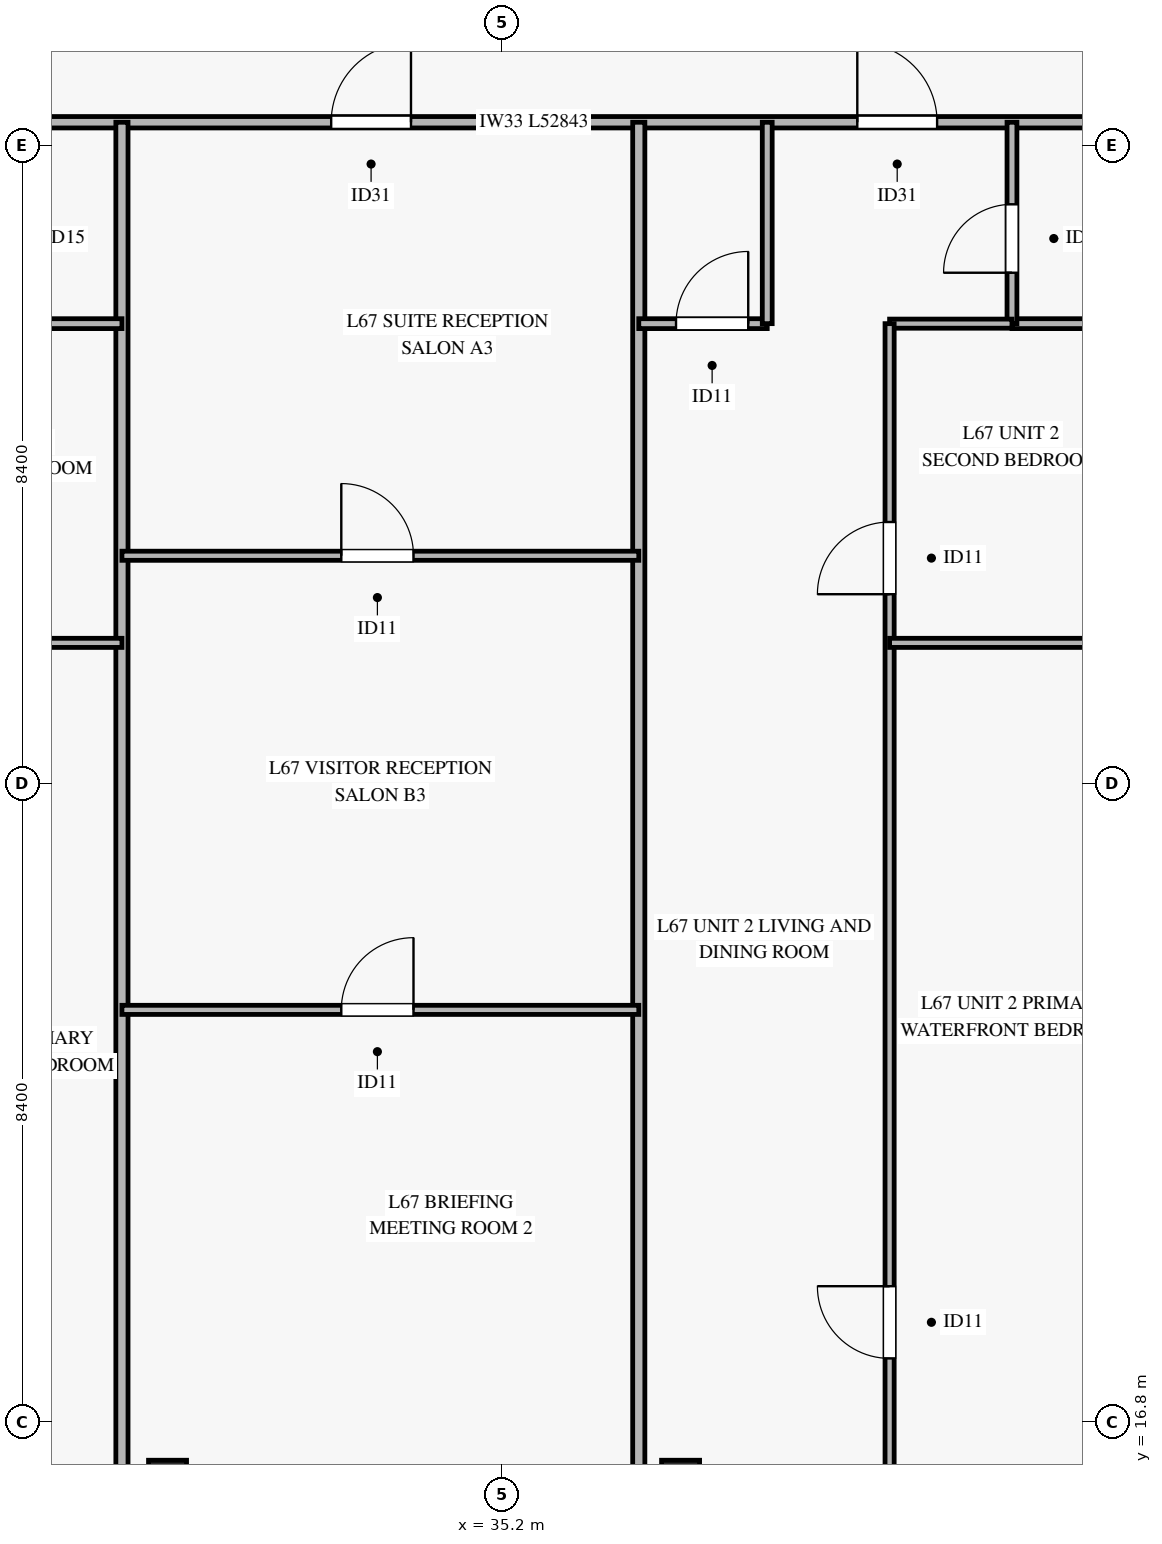
"""IFC4 building model, lengths in metres.
Left out: names, types, materials, properties, quantities, classifications, styles, units other than length and angle.
Written with IfcOpenShell. Run it as: python <this file> out.ifc"""

import sys

from ifc_helpers import new_model, si_unit, direction, frame, frame_2d, origin, origin_2d, place, context, subcontext, project, spatial, rectangle, hollow_rectangle, extrude, source, transform, mapped, element, fill, save


model = new_model("IFC4")
c1 = context("Model", 3, precision=1e-05, world=origin(), true_north=direction((0.0, 1.0)))
c2 = subcontext(c1, "Body", "Model", "MODEL_VIEW")
j1 = project(units=[si_unit("LENGTHUNIT", "METRE"), si_unit("PLANEANGLEUNIT", "RADIAN")], contexts=[c1])
p1 = place(None, origin())
s1 = spatial("IfcSite", under=j1, at=p1, CompositionType="ELEMENT")
p2 = place(p1, origin())
s2 = spatial("IfcBuilding", under=s1, at=p2, CompositionType="ELEMENT")
p3 = place(p2, frame((0.0, 0.0, 262.1)))
s3 = spatial("IfcBuildingStorey", under=s2, at=p3, CompositionType="ELEMENT", Elevation=262.1)
m1 = source(origin(), c2, "Body", "SweptSolid", [
    extrude(hollow_rectangle(XDim=0.5, YDim=0.5, WallThickness=0.024, at=origin_2d()), origin(), (0.0, 0.0, 1.0), 3.185),
])
for number, where, z_axis, x_axis in (
    (1, (30.8, 16.045, 0.0), (0.0, 0.0, 1.0), (1.0, 0.0, 0.0)),
    (2, (37.55, 16.045, 0.0), (0.0, 0.0, 1.0), (1.0, 0.0, 0.0)),
):
    element("IfcColumn", number, at=place(p3, frame(where, z_axis=z_axis, x_axis=x_axis)), inside=s3, PredefinedType="COLUMN", context=c2, shape_type="MappedRepresentation", body=[
        mapped(m1, transform((0.0, 0.0, 0.0), x_axis=(1.0, 0.0, 0.0), y_axis=(0.0, 1.0, 0.0), z_axis=(0.0, 0.0, 1.0), scale=1.0)),
    ])
p4 = place(p3, frame((8.779, 33.9, 0.0), z_axis=(0.0, 0.0, 1.0), x_axis=(1.0, 0.0, 0.0)))
e3 = element("IfcWall", 3, at=p4, inside=s3, PredefinedType="PARTITIONING", context=c2, shape_type="SweptSolid", body=[
    extrude(rectangle(XDim=52.843, YDim=0.15, at=frame_2d((26.421, 0.0))), origin(), (0.0, 0.0, 1.0), 2.47),
])
p5 = place(p4, frame((5.887, 0.0, 0.0)))
e4 = element("IfcOpeningElement", 4, at=p5, cuts=e3, PredefinedType="OPENING", context=c2, shape_type="SweptSolid", body=[
    extrude(rectangle(XDim=1.05, YDim=2.15, at=frame_2d((0.525, 1.075))), frame((0.0, 0.085, 0.0), z_axis=(0.0, -1.0, 0.0), x_axis=(1.0, 0.0, 0.0)), (0.0, 0.0, 1.0), 0.17),
])
p6 = place(p4, frame((17.646, 0.0, 0.0)))
e5 = element("IfcOpeningElement", 5, at=p6, cuts=e3, PredefinedType="OPENING", context=c2, shape_type="SweptSolid", body=[
    extrude(rectangle(XDim=1.05, YDim=2.15, at=frame_2d((0.525, 1.075))), frame((0.0, 0.085, 0.0), z_axis=(0.0, -1.0, 0.0), x_axis=(1.0, 0.0, 0.0)), (0.0, 0.0, 1.0), 0.17),
])
p7 = place(p4, frame((24.174, 0.0, 0.0)))
e6 = element("IfcOpeningElement", 6, at=p7, cuts=e3, PredefinedType="OPENING", context=c2, shape_type="SweptSolid", body=[
    extrude(rectangle(XDim=1.05, YDim=2.15, at=frame_2d((0.525, 1.075))), frame((0.0, 0.085, 0.0), z_axis=(0.0, -1.0, 0.0), x_axis=(1.0, 0.0, 0.0)), (0.0, 0.0, 1.0), 0.17),
])
p8 = place(p4, frame((31.096, 0.0, 0.0)))
e7 = element("IfcOpeningElement", 7, at=p8, cuts=e3, PredefinedType="OPENING", context=c2, shape_type="SweptSolid", body=[
    extrude(rectangle(XDim=1.05, YDim=2.15, at=frame_2d((0.525, 1.075))), frame((0.0, 0.085, 0.0), z_axis=(0.0, -1.0, 0.0), x_axis=(1.0, 0.0, 0.0)), (0.0, 0.0, 1.0), 0.17),
])
p9 = place(p4, frame((37.241, 0.0, 0.0)))
e8 = element("IfcOpeningElement", 8, at=p9, cuts=e3, PredefinedType="OPENING", context=c2, shape_type="SweptSolid", body=[
    extrude(rectangle(XDim=1.05, YDim=2.15, at=frame_2d((0.525, 1.075))), frame((0.0, 0.085, 0.0), z_axis=(0.0, -1.0, 0.0), x_axis=(1.0, 0.0, 0.0)), (0.0, 0.0, 1.0), 0.17),
])
p10 = place(p4, frame((45.359, 0.0, 0.0)))
e9 = element("IfcOpeningElement", 9, at=p10, cuts=e3, PredefinedType="OPENING", context=c2, shape_type="SweptSolid", body=[
    extrude(rectangle(XDim=1.05, YDim=2.15, at=frame_2d((0.525, 1.075))), frame((0.0, 0.085, 0.0), z_axis=(0.0, -1.0, 0.0), x_axis=(1.0, 0.0, 0.0)), (0.0, 0.0, 1.0), 0.17),
])
for number, where, z_axis, x_axis in (
    (10, (30.2, 16.045, 0.0), (0.0, 0.0, 1.0), (0.0, 1.0, 0.0)),
    (11, (37.0, 16.045, 0.0), (0.0, 0.0, 1.0), (0.0, 1.0, 0.0)),
):
    element("IfcWall", number, at=place(p3, frame(where, z_axis=z_axis, x_axis=x_axis)), inside=s3, PredefinedType="PARTITIONING", context=c2, shape_type="SweptSolid", body=[
        extrude(rectangle(XDim=17.855, YDim=0.16, at=frame_2d((8.927, 0.0))), origin(), (0.0, 0.0, 1.0), 2.77),
    ])
p11 = place(p3, frame((28.485, 31.25, 0.0), z_axis=(0.0, 0.0, 1.0), x_axis=(1.0, 0.0, 0.0)))
e12 = element("IfcWall", 12, at=p11, inside=s3, PredefinedType="PARTITIONING", context=c2, shape_type="SweptSolid", body=[
    extrude(rectangle(XDim=1.715, YDim=0.13, at=frame_2d((0.857, 0.0))), origin(), (0.0, 0.0, 1.0), 3.185),
])
p12 = place(p3, frame((26.98, 27.05, 0.0), z_axis=(0.0, 0.0, 1.0), x_axis=(1.0, 0.0, 0.0)))
e13 = element("IfcWall", 13, at=p12, inside=s3, PredefinedType="PARTITIONING", context=c2, shape_type="SweptSolid", body=[
    extrude(rectangle(XDim=3.22, YDim=0.12, at=frame_2d((1.61, 0.0))), origin(), (0.0, 0.0, 1.0), 3.185),
])
p13 = place(p3, frame((30.2, 22.221, 0.0), z_axis=(0.0, 0.0, 1.0), x_axis=(1.0, 0.0, 0.0)))
e14 = element("IfcWall", 14, at=p13, inside=s3, PredefinedType="PARTITIONING", context=c2, shape_type="SweptSolid", body=[
    extrude(rectangle(XDim=6.8, YDim=0.12, at=frame_2d((3.4, 0.0))), origin(), (0.0, 0.0, 1.0), 2.47),
])
p14 = place(p13, frame((2.886, 0.0, 0.0)))
e15 = element("IfcOpeningElement", 15, at=p14, cuts=e14, PredefinedType="OPENING", context=c2, shape_type="SweptSolid", body=[
    extrude(rectangle(XDim=0.95, YDim=2.1, at=frame_2d((0.475, 1.05))), frame((0.0, 0.07, 0.0), z_axis=(0.0, -1.0, 0.0), x_axis=(1.0, 0.0, 0.0)), (0.0, 0.0, 1.0), 0.14),
])
p15 = place(p3, frame((30.2, 28.196, 0.0), z_axis=(0.0, 0.0, 1.0), x_axis=(1.0, 0.0, 0.0)))
e16 = element("IfcWall", 16, at=p15, inside=s3, PredefinedType="PARTITIONING", context=c2, shape_type="SweptSolid", body=[
    extrude(rectangle(XDim=6.8, YDim=0.12, at=frame_2d((3.4, 0.0))), origin(), (0.0, 0.0, 1.0), 2.47),
])
p16 = place(p15, frame((2.886, 0.0, 0.0)))
e17 = element("IfcOpeningElement", 17, at=p16, cuts=e16, PredefinedType="OPENING", context=c2, shape_type="SweptSolid", body=[
    extrude(rectangle(XDim=0.95, YDim=2.1, at=frame_2d((0.475, 1.05))), frame((0.0, 0.07, 0.0), z_axis=(0.0, -1.0, 0.0), x_axis=(1.0, 0.0, 0.0)), (0.0, 0.0, 1.0), 0.14),
])
p17 = place(p3, frame((37.0, 31.25, 0.0), z_axis=(0.0, 0.0, 1.0), x_axis=(1.0, 0.0, 0.0)))
e18 = element("IfcWall", 18, at=p17, inside=s3, PredefinedType="PARTITIONING", context=c2, shape_type="SweptSolid", body=[
    extrude(rectangle(XDim=1.69, YDim=0.13, at=frame_2d((0.845, 0.0))), origin(), (0.0, 0.0, 1.0), 2.47),
])
p18 = place(p17, frame((0.49, 0.0, 0.0)))
e19 = element("IfcOpeningElement", 19, at=p18, cuts=e18, PredefinedType="OPENING", context=c2, shape_type="SweptSolid", body=[
    extrude(rectangle(XDim=0.95, YDim=2.1, at=frame_2d((0.475, 1.05))), frame((0.0, 0.075, 0.0), z_axis=(0.0, -1.0, 0.0), x_axis=(1.0, 0.0, 0.0)), (0.0, 0.0, 1.0), 0.15),
])
p19 = place(p3, frame((38.69, 31.25, 0.0), z_axis=(0.0, 0.0, 1.0), x_axis=(0.0, 1.0, 0.0)))
e20 = element("IfcWall", 20, at=p19, inside=s3, PredefinedType="PARTITIONING", context=c2, shape_type="SweptSolid", body=[
    extrude(rectangle(XDim=2.65, YDim=0.13, at=frame_2d((1.325, 0.0))), origin(), (0.0, 0.0, 1.0), 2.77),
])
p20 = place(p3, frame((41.91, 31.25, 0.0), z_axis=(0.0, 0.0, 1.0), x_axis=(1.0, 0.0, 0.0)))
e21 = element("IfcWall", 21, at=p20, inside=s3, PredefinedType="PARTITIONING", context=c2, shape_type="SweptSolid", body=[
    extrude(rectangle(XDim=1.69, YDim=0.13, at=frame_2d((0.845, 0.0))), origin(), (0.0, 0.0, 1.0), 3.185),
])
p21 = place(p3, frame((41.91, 31.25, 0.0), z_axis=(0.0, 0.0, 1.0), x_axis=(0.0, 1.0, 0.0)))
e22 = element("IfcWall", 22, at=p21, inside=s3, PredefinedType="PARTITIONING", context=c2, shape_type="SweptSolid", body=[
    extrude(rectangle(XDim=2.65, YDim=0.13, at=frame_2d((1.325, 0.0))), origin(), (0.0, 0.0, 1.0), 2.77),
])
p22 = place(p21, frame((0.67, 0.0, 0.0)))
e23 = element("IfcOpeningElement", 23, at=p22, cuts=e22, PredefinedType="OPENING", context=c2, shape_type="SweptSolid", body=[
    extrude(rectangle(XDim=0.9, YDim=2.1, at=frame_2d((0.45, 1.05))), frame((0.0, 0.075, 0.0), z_axis=(0.0, -1.0, 0.0), x_axis=(1.0, 0.0, 0.0)), (0.0, 0.0, 1.0), 0.15),
])
p23 = place(p3, frame((40.3, 31.25, 0.0), z_axis=(0.0, 0.0, 1.0), x_axis=(1.0, 0.0, 0.0)))
e24 = element("IfcWall", 24, at=p23, inside=s3, PredefinedType="PARTITIONING", context=c2, shape_type="SweptSolid", body=[
    extrude(rectangle(XDim=1.61, YDim=0.12, at=frame_2d((0.805, 0.0))), origin(), (0.0, 0.0, 1.0), 3.185),
])
p24 = place(p3, frame((40.3, 16.045, 0.0), z_axis=(0.0, 0.0, 1.0), x_axis=(0.0, 1.0, 0.0)))
e25 = element("IfcWall", 25, at=p24, inside=s3, PredefinedType="PARTITIONING", context=c2, shape_type="SweptSolid", body=[
    extrude(rectangle(XDim=15.205, YDim=0.12, at=frame_2d((7.603, 0.0))), origin(), (0.0, 0.0, 1.0), 2.77),
])
p25 = place(p24, frame((1.59, 0.0, 0.0)))
e26 = element("IfcOpeningElement", 26, at=p25, cuts=e25, PredefinedType="OPENING", context=c2, shape_type="SweptSolid", body=[
    extrude(rectangle(XDim=0.95, YDim=2.1, at=frame_2d((0.475, 1.05))), frame((0.0, 0.07, 0.0), z_axis=(0.0, -1.0, 0.0), x_axis=(1.0, 0.0, 0.0)), (0.0, 0.0, 1.0), 0.14),
])
p26 = place(p24, frame((11.645, 0.0, 0.0)))
e27 = element("IfcOpeningElement", 27, at=p26, cuts=e25, PredefinedType="OPENING", context=c2, shape_type="SweptSolid", body=[
    extrude(rectangle(XDim=0.95, YDim=2.1, at=frame_2d((0.475, 1.05))), frame((0.0, 0.07, 0.0), z_axis=(0.0, -1.0, 0.0), x_axis=(1.0, 0.0, 0.0)), (0.0, 0.0, 1.0), 0.14),
])
p27 = place(p3, frame((40.3, 27.05, 0.0), z_axis=(0.0, 0.0, 1.0), x_axis=(1.0, 0.0, 0.0)))
e28 = element("IfcWall", 28, at=p27, inside=s3, PredefinedType="PARTITIONING", context=c2, shape_type="SweptSolid", body=[
    extrude(rectangle(XDim=3.3, YDim=0.12, at=frame_2d((1.65, 0.0))), origin(), (0.0, 0.0, 1.0), 3.185),
])
m2 = source(origin(), c2, "Body", "SweptSolid", [
    extrude(rectangle(XDim=1.05, YDim=2.15, at=frame_2d((0.525, 1.075))), frame((0.0, 0.025, 0.0), z_axis=(0.0, -1.0, 0.0), x_axis=(1.0, 0.0, 0.0)), (0.0, 0.0, 1.0), 0.05),
])
p28 = place(p7, origin())
e29 = element("IfcDoor", 29, at=p28, inside=s3, OperationType="SINGLE_SWING_RIGHT", PredefinedType="DOOR", context=c2, shape_type="MappedRepresentation", body=[
    mapped(m2, transform((0.0, 0.0, 0.0), x_axis=(1.0, 0.0, 0.0), y_axis=(0.0, 1.0, 0.0), z_axis=(0.0, 0.0, 1.0), scale=1.0)),
])
fill(e6, e29)
m3 = source(origin(), c2, "Body", "SweptSolid", [
    extrude(rectangle(XDim=0.95, YDim=2.1, at=frame_2d((0.475, 1.05))), frame((0.0, 0.025, 0.0), z_axis=(0.0, -1.0, 0.0), x_axis=(1.0, 0.0, 0.0)), (0.0, 0.0, 1.0), 0.05),
])
p29 = place(p16, origin())
e30 = element("IfcDoor", 30, at=p29, inside=s3, OperationType="SINGLE_SWING_LEFT", PredefinedType="DOOR", context=c2, shape_type="MappedRepresentation", body=[
    mapped(m3, transform((0.0, 0.0, 0.0), x_axis=(1.0, 0.0, 0.0), y_axis=(0.0, 1.0, 0.0), z_axis=(0.0, 0.0, 1.0), scale=1.0)),
])
fill(e17, e30)
p30 = place(p14, origin())
e31 = element("IfcDoor", 31, at=p30, inside=s3, OperationType="SINGLE_SWING_RIGHT", PredefinedType="DOOR", context=c2, shape_type="MappedRepresentation", body=[
    mapped(m3, transform((0.0, 0.0, 0.0), x_axis=(1.0, 0.0, 0.0), y_axis=(0.0, 1.0, 0.0), z_axis=(0.0, 0.0, 1.0), scale=1.0)),
])
fill(e15, e31)
p31 = place(p8, origin())
e32 = element("IfcDoor", 32, at=p31, inside=s3, OperationType="SINGLE_SWING_LEFT", PredefinedType="DOOR", context=c2, shape_type="MappedRepresentation", body=[
    mapped(m2, transform((0.0, 0.0, 0.0), x_axis=(1.0, 0.0, 0.0), y_axis=(0.0, 1.0, 0.0), z_axis=(0.0, 0.0, 1.0), scale=1.0)),
])
fill(e7, e32)
p32 = place(p18, origin())
e33 = element("IfcDoor", 33, at=p32, inside=s3, OperationType="SINGLE_SWING_RIGHT", PredefinedType="DOOR", context=c2, shape_type="MappedRepresentation", body=[
    mapped(m3, transform((0.0, 0.0, 0.0), x_axis=(1.0, 0.0, 0.0), y_axis=(0.0, 1.0, 0.0), z_axis=(0.0, 0.0, 1.0), scale=1.0)),
])
fill(e19, e33)
m4 = source(origin(), c2, "Body", "SweptSolid", [
    extrude(rectangle(XDim=0.9, YDim=2.1, at=frame_2d((0.45, 1.05))), frame((0.0, 0.025, 0.0), z_axis=(0.0, -1.0, 0.0), x_axis=(1.0, 0.0, 0.0)), (0.0, 0.0, 1.0), 0.05),
])
p33 = place(p22, origin())
e34 = element("IfcDoor", 34, at=p33, inside=s3, OperationType="SINGLE_SWING_LEFT", PredefinedType="DOOR", context=c2, shape_type="MappedRepresentation", body=[
    mapped(m4, transform((0.0, 0.0, 0.0), x_axis=(1.0, 0.0, 0.0), y_axis=(0.0, 1.0, 0.0), z_axis=(0.0, 0.0, 1.0), scale=1.0)),
])
fill(e23, e34)
p34 = place(p25, origin())
e35 = element("IfcDoor", 35, at=p34, inside=s3, OperationType="SINGLE_SWING_RIGHT", PredefinedType="DOOR", context=c2, shape_type="MappedRepresentation", body=[
    mapped(m3, transform((0.0, 0.0, 0.0), x_axis=(1.0, 0.0, 0.0), y_axis=(0.0, 1.0, 0.0), z_axis=(0.0, 0.0, 1.0), scale=1.0)),
])
fill(e26, e35)
p35 = place(p26, origin())
e36 = element("IfcDoor", 36, at=p35, inside=s3, OperationType="SINGLE_SWING_LEFT", PredefinedType="DOOR", context=c2, shape_type="MappedRepresentation", body=[
    mapped(m3, transform((0.0, 0.0, 0.0), x_axis=(1.0, 0.0, 0.0), y_axis=(0.0, 1.0, 0.0), z_axis=(0.0, 0.0, 1.0), scale=1.0)),
])
fill(e27, e36)
save(model, sys.argv[1])
